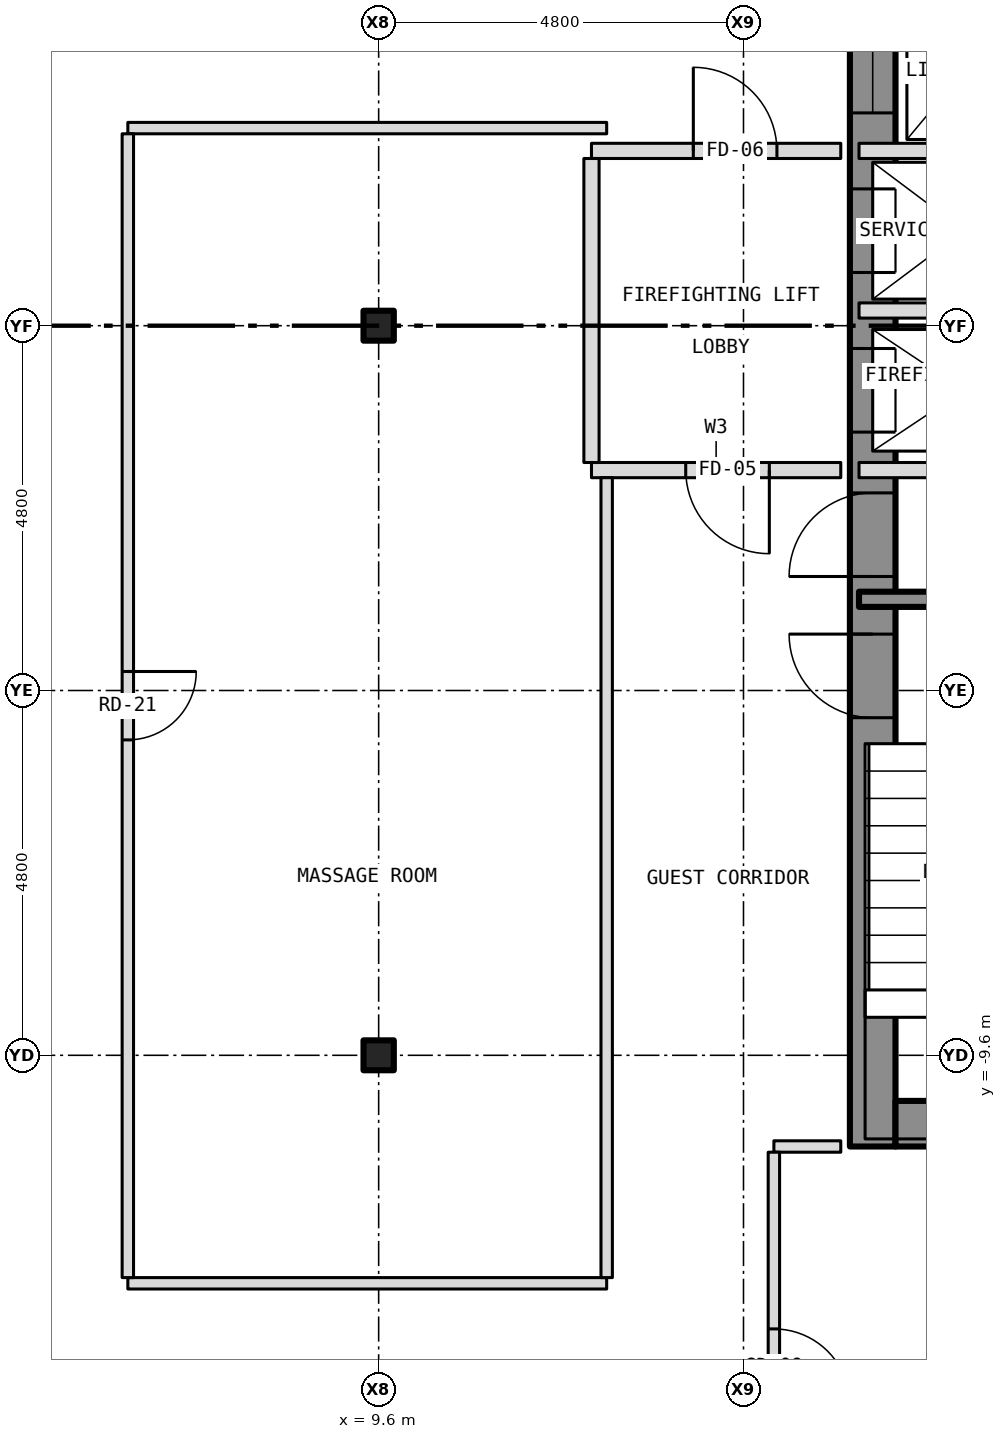
"""IFC4 building model, lengths in metres.
Left out: names, types, materials, properties, quantities, classifications, styles, units other than length and angle.
Written with IfcOpenShell. Run it as: python <this file> out.ifc"""

import sys

from ifc_helpers import new_model, si_unit, direction, frame, frame_2d, origin, origin_2d, place, context, subcontext, project, spatial, rectangle, i_section, extrude, element, fill, save


model = new_model("IFC4")
c1 = context("Model", 3, precision=1e-05, world=origin(), true_north=direction((0.0, 1.0)))
c2 = subcontext(c1, "Body", "Model", "MODEL_VIEW")
j1 = project(units=[si_unit("LENGTHUNIT", "METRE"), si_unit("PLANEANGLEUNIT", "RADIAN")], contexts=[c1])
p1 = place(None, origin())
s1 = spatial("IfcSite", under=j1, at=p1, CompositionType="ELEMENT")
p2 = place(p1, origin())
s2 = spatial("IfcBuilding", under=s1, at=p2, CompositionType="ELEMENT")
p3 = place(p2, frame((0.0, 0.0, 110.0)))
s3 = spatial("IfcBuildingStorey", under=s2, at=p3, CompositionType="ELEMENT", Elevation=110.0)
for number, where, z_axis, x_axis in (
    (1, (9.6, -9.6, -0.15), (0.0, 0.0, 1.0), (1.0, 0.0, 0.0)),
    (2, (9.6, 0.0, -0.15), (0.0, 0.0, 1.0), (1.0, 0.0, 0.0)),
):
    element("IfcColumn", number, at=place(p3, frame(where, z_axis=z_axis, x_axis=x_axis)), inside=s3, PredefinedType="COLUMN", context=c2, shape_type="SweptSolid", body=[
        extrude(i_section(OverallWidth=0.399, OverallDepth=0.394, WebThickness=0.023, FlangeThickness=0.037, at=origin_2d()), origin(), (0.0, 0.0, 1.0), 3.5),
    ])
p4 = place(p3, frame((16.1, -10.8, 0.0), z_axis=(0.0, 0.0, 1.0), x_axis=(0.0, 1.0, 0.0)))
e3 = element("IfcWall", 3, at=p4, inside=s3, PredefinedType="SHEAR", context=c2, shape_type="SweptSolid", body=[
    extrude(rectangle(XDim=21.6, YDim=0.6, at=frame_2d((10.8, 0.0))), origin(), (0.0, 0.0, 1.0), 3.25),
])
p5 = place(p4, frame((9.4, 0.0, 0.0)))
e4 = element("IfcOpeningElement", 4, at=p5, cuts=e3, PredefinedType="OPENING", context=c2, shape_type="SweptSolid", body=[
    extrude(rectangle(XDim=1.1, YDim=2.1, at=frame_2d((0.55, 1.05))), frame((0.0, 0.312, 0.0), z_axis=(0.0, -1.0, 0.0), x_axis=(1.0, 0.0, 0.0)), (0.0, 0.0, 1.0), 0.624),
])
p6 = place(p4, frame((11.5, 0.0, 0.0)))
e5 = element("IfcOpeningElement", 5, at=p6, cuts=e3, PredefinedType="OPENING", context=c2, shape_type="SweptSolid", body=[
    extrude(rectangle(XDim=1.1, YDim=2.1, at=frame_2d((0.55, 1.05))), frame((0.0, 0.312, 0.0), z_axis=(0.0, -1.0, 0.0), x_axis=(1.0, 0.0, 0.0)), (0.0, 0.0, 1.0), 0.624),
])
p7 = place(p4, frame((13.6, 0.0, 0.0)))
e6 = element("IfcOpeningElement", 6, at=p7, cuts=e3, PredefinedType="OPENING", context=c2, shape_type="SweptSolid", body=[
    extrude(rectangle(XDim=1.1, YDim=2.1, at=frame_2d((0.55, 1.05))), frame((0.0, 0.312, 0.0), z_axis=(0.0, -1.0, 0.0), x_axis=(1.0, 0.0, 0.0)), (0.0, 0.0, 1.0), 0.624),
])
p8 = place(p4, frame((15.7, 0.0, 0.0)))
e7 = element("IfcOpeningElement", 7, at=p8, cuts=e3, PredefinedType="OPENING", context=c2, shape_type="SweptSolid", body=[
    extrude(rectangle(XDim=1.1, YDim=2.1, at=frame_2d((0.55, 1.05))), frame((0.0, 0.312, 0.0), z_axis=(0.0, -1.0, 0.0), x_axis=(1.0, 0.0, 0.0)), (0.0, 0.0, 1.0), 0.624),
])
p9 = place(p4, frame((17.8, 0.0, 0.0)))
e8 = element("IfcOpeningElement", 8, at=p9, cuts=e3, PredefinedType="OPENING", context=c2, shape_type="SweptSolid", body=[
    extrude(rectangle(XDim=1.1, YDim=2.1, at=frame_2d((0.55, 1.05))), frame((0.0, 0.312, 0.0), z_axis=(0.0, -1.0, 0.0), x_axis=(1.0, 0.0, 0.0)), (0.0, 0.0, 1.0), 0.624),
])
p10 = place(p4, frame((5.642, 0.0, 0.0)))
e9 = element("IfcOpeningElement", 9, at=p10, cuts=e3, PredefinedType="OPENING", context=c2, shape_type="SweptSolid", body=[
    extrude(rectangle(XDim=1.1, YDim=2.1, at=frame_2d((0.55, 1.05))), frame((0.0, 0.312, 0.0), z_axis=(0.0, -1.0, 0.0), x_axis=(1.0, 0.0, 0.0)), (0.0, 0.0, 1.0), 0.624),
])
p11 = place(p4, frame((7.5, 0.0, 0.0)))
e10 = element("IfcOpeningElement", 10, at=p11, cuts=e3, PredefinedType="OPENING", context=c2, shape_type="SweptSolid", body=[
    extrude(rectangle(XDim=1.1, YDim=2.1, at=frame_2d((0.55, 1.05))), frame((0.0, 0.312, 0.0), z_axis=(0.0, -1.0, 0.0), x_axis=(1.0, 0.0, 0.0)), (0.0, 0.0, 1.0), 0.624),
])
p12 = place(p3, frame((16.4, -10.5, 0.0), z_axis=(0.0, 0.0, 1.0), x_axis=(1.0, 0.0, 0.0)))
e11 = element("IfcWall", 11, at=p12, inside=s3, PredefinedType="SHEAR", context=c2, shape_type="SweptSolid", body=[
    extrude(rectangle(XDim=5.8, YDim=0.6, at=frame_2d((2.9, 0.0))), origin(), (0.0, 0.0, 1.0), 3.25),
])
p13 = place(p3, frame((6.3, -12.6, 0.0), z_axis=(0.0, 0.0, 1.0), x_axis=(1.0, 0.0, 0.0)))
e12 = element("IfcWall", 12, at=p13, inside=s3, PredefinedType="PARTITIONING", context=c2, shape_type="SweptSolid", body=[
    extrude(rectangle(XDim=6.3, YDim=0.15, at=frame_2d((3.15, 0.0))), origin(), (0.0, 0.0, 1.0), 3.35),
])
p14 = place(p3, frame((14.8, -10.8, 0.0), z_axis=(0.0, 0.0, 1.0), x_axis=(1.0, 0.0, 0.0)))
e13 = element("IfcWall", 13, at=p14, inside=s3, PredefinedType="PARTITIONING", context=c2, shape_type="SweptSolid", body=[
    extrude(rectangle(XDim=0.88, YDim=0.15, at=frame_2d((0.44, 0.0))), origin(), (0.0, 0.0, 1.0), 3.35),
])
p15 = place(p3, frame((15.92, -3.6, 0.0), z_axis=(0.0, 0.0, 1.0), x_axis=(1.0, 0.0, 0.0)))
e14 = element("IfcWall", 14, at=p15, inside=s3, PredefinedType="SHEAR", context=c2, shape_type="SweptSolid", body=[
    extrude(rectangle(XDim=4.08, YDim=0.2, at=frame_2d((2.04, 0.0))), origin(), (0.0, 0.0, 1.0), 3.25),
])
p16 = place(p3, frame((12.4, -1.9, 0.0), z_axis=(0.0, 0.0, 1.0), x_axis=(1.0, 0.0, 0.0)))
e15 = element("IfcWall", 15, at=p16, inside=s3, PredefinedType="PARTITIONING", context=c2, shape_type="SweptSolid", body=[
    extrude(rectangle(XDim=3.28, YDim=0.2, at=frame_2d((1.64, 0.0))), origin(), (0.0, 0.0, 1.0), 3.35),
])
p17 = place(p16, frame((1.24, 0.0, 0.0)))
e16 = element("IfcOpeningElement", 16, at=p17, cuts=e15, PredefinedType="OPENING", context=c2, shape_type="SweptSolid", body=[
    extrude(rectangle(XDim=1.1, YDim=2.1, at=frame_2d((0.55, 1.05))), frame((0.0, 0.112, 0.0), z_axis=(0.0, -1.0, 0.0), x_axis=(1.0, 0.0, 0.0)), (0.0, 0.0, 1.0), 0.224),
])
p18 = place(p3, frame((15.92, -1.9, 0.0), z_axis=(0.0, 0.0, 1.0), x_axis=(1.0, 0.0, 0.0)))
e17 = element("IfcWall", 17, at=p18, inside=s3, PredefinedType="PARTITIONING", context=c2, shape_type="SweptSolid", body=[
    extrude(rectangle(XDim=6.76, YDim=0.2, at=frame_2d((3.38, 0.0))), origin(), (0.0, 0.0, 1.0), 3.25),
])
p19 = place(p18, frame((3.74, 0.0, 0.0)))
e18 = element("IfcOpeningElement", 18, at=p19, cuts=e17, PredefinedType="OPENING", context=c2, shape_type="SweptSolid", body=[
    extrude(rectangle(XDim=0.9, YDim=2.1, at=frame_2d((0.45, 1.05))), frame((0.0, 0.112, 0.0), z_axis=(0.0, -1.0, 0.0), x_axis=(1.0, 0.0, 0.0)), (0.0, 0.0, 1.0), 0.224),
])
p20 = place(p3, frame((15.92, 0.2, 0.0), z_axis=(0.0, 0.0, 1.0), x_axis=(1.0, 0.0, 0.0)))
e19 = element("IfcWall", 19, at=p20, inside=s3, PredefinedType="PARTITIONING", context=c2, shape_type="SweptSolid", body=[
    extrude(rectangle(XDim=2.88, YDim=0.2, at=frame_2d((1.44, 0.0))), origin(), (0.0, 0.0, 1.0), 3.25),
])
p21 = place(p3, frame((12.4, 2.3, 0.0), z_axis=(0.0, 0.0, 1.0), x_axis=(1.0, 0.0, 0.0)))
e20 = element("IfcWall", 20, at=p21, inside=s3, PredefinedType="PARTITIONING", context=c2, shape_type="SweptSolid", body=[
    extrude(rectangle(XDim=3.28, YDim=0.2, at=frame_2d((1.64, 0.0))), origin(), (0.0, 0.0, 1.0), 3.35),
])
p22 = place(p21, frame((1.34, 0.0, 0.0)))
e21 = element("IfcOpeningElement", 21, at=p22, cuts=e20, PredefinedType="OPENING", context=c2, shape_type="SweptSolid", body=[
    extrude(rectangle(XDim=1.1, YDim=2.1, at=frame_2d((0.55, 1.05))), frame((0.0, 0.112, 0.0), z_axis=(0.0, -1.0, 0.0), x_axis=(1.0, 0.0, 0.0)), (0.0, 0.0, 1.0), 0.224),
])
p23 = place(p3, frame((15.92, 2.3, 0.0), z_axis=(0.0, 0.0, 1.0), x_axis=(1.0, 0.0, 0.0)))
e22 = element("IfcWall", 22, at=p23, inside=s3, PredefinedType="PARTITIONING", context=c2, shape_type="SweptSolid", body=[
    extrude(rectangle(XDim=2.88, YDim=0.2, at=frame_2d((1.44, 0.0))), origin(), (0.0, 0.0, 1.0), 3.25),
])
p24 = place(p3, frame((6.3, 2.6, 0.0), z_axis=(0.0, 0.0, 1.0), x_axis=(1.0, 0.0, 0.0)))
e23 = element("IfcWall", 23, at=p24, inside=s3, PredefinedType="PARTITIONING", context=c2, shape_type="SweptSolid", body=[
    extrude(rectangle(XDim=6.3, YDim=0.15, at=frame_2d((3.15, 0.0))), origin(), (0.0, 0.0, 1.0), 3.35),
])
p25 = place(p3, frame((6.3, -12.525, 0.0), z_axis=(0.0, 0.0, 1.0), x_axis=(0.0, 1.0, 0.0)))
e24 = element("IfcWall", 24, at=p25, inside=s3, PredefinedType="PARTITIONING", context=c2, shape_type="SweptSolid", body=[
    extrude(rectangle(XDim=15.05, YDim=0.15, at=frame_2d((7.525, 0.0))), origin(), (0.0, 0.0, 1.0), 3.35),
])
p26 = place(p25, frame((7.075, 0.0, 0.0)))
e25 = element("IfcOpeningElement", 25, at=p26, cuts=e24, PredefinedType="OPENING", context=c2, shape_type="SweptSolid", body=[
    extrude(rectangle(XDim=0.9, YDim=2.1, at=frame_2d((0.45, 1.05))), frame((0.0, 0.087, 0.0), z_axis=(0.0, -1.0, 0.0), x_axis=(1.0, 0.0, 0.0)), (0.0, 0.0, 1.0), 0.174),
])
p27 = place(p3, frame((12.4, -1.8, 0.0), z_axis=(0.0, 0.0, 1.0), x_axis=(0.0, 1.0, 0.0)))
e26 = element("IfcWall", 26, at=p27, inside=s3, PredefinedType="PARTITIONING", context=c2, shape_type="SweptSolid", body=[
    extrude(rectangle(XDim=4.0, YDim=0.2, at=frame_2d((2.0, 0.0))), origin(), (0.0, 0.0, 1.0), 3.35),
])
p28 = place(p3, frame((12.6, -12.525, 0.0), z_axis=(0.0, 0.0, 1.0), x_axis=(0.0, 1.0, 0.0)))
e27 = element("IfcWall", 27, at=p28, inside=s3, PredefinedType="PARTITIONING", context=c2, shape_type="SweptSolid", body=[
    extrude(rectangle(XDim=10.525, YDim=0.15, at=frame_2d((5.262, 0.0))), origin(), (0.0, 0.0, 1.0), 3.35),
])
p29 = place(p3, frame((14.8, -14.725, 0.0), z_axis=(0.0, 0.0, 1.0), x_axis=(0.0, 1.0, 0.0)))
e28 = element("IfcWall", 28, at=p29, inside=s3, PredefinedType="PARTITIONING", context=c2, shape_type="SweptSolid", body=[
    extrude(rectangle(XDim=3.85, YDim=0.15, at=frame_2d((1.925, 0.0))), origin(), (0.0, 0.0, 1.0), 3.35),
])
p30 = place(p29, frame((0.525, 0.0, 0.0)))
e29 = element("IfcOpeningElement", 29, at=p30, cuts=e28, PredefinedType="OPENING", context=c2, shape_type="SweptSolid", body=[
    extrude(rectangle(XDim=1.0, YDim=2.1, at=frame_2d((0.5, 1.05))), frame((0.0, 0.087, 0.0), z_axis=(0.0, -1.0, 0.0), x_axis=(1.0, 0.0, 0.0)), (0.0, 0.0, 1.0), 0.174),
])
p31 = place(p5, origin())
e30 = element("IfcDoor", 30, at=p31, inside=s3, OperationType="SLIDING_TO_LEFT", PredefinedType="DOOR", context=c2, shape_type="SweptSolid", body=[
    extrude(rectangle(XDim=1.1, YDim=2.1, at=frame_2d((0.55, 1.05))), frame((0.0, 0.025, 0.0), z_axis=(0.0, -1.0, 0.0), x_axis=(1.0, 0.0, 0.0)), (0.0, 0.0, 1.0), 0.05),
])
fill(e4, e30)
p32 = place(p6, origin())
e31 = element("IfcDoor", 31, at=p32, inside=s3, OperationType="SLIDING_TO_LEFT", PredefinedType="DOOR", context=c2, shape_type="SweptSolid", body=[
    extrude(rectangle(XDim=1.1, YDim=2.1, at=frame_2d((0.55, 1.05))), frame((0.0, 0.025, 0.0), z_axis=(0.0, -1.0, 0.0), x_axis=(1.0, 0.0, 0.0)), (0.0, 0.0, 1.0), 0.05),
])
fill(e5, e31)
p33 = place(p7, origin())
e32 = element("IfcDoor", 32, at=p33, inside=s3, OperationType="SLIDING_TO_LEFT", PredefinedType="DOOR", context=c2, shape_type="SweptSolid", body=[
    extrude(rectangle(XDim=1.1, YDim=2.1, at=frame_2d((0.55, 1.05))), frame((0.0, 0.025, 0.0), z_axis=(0.0, -1.0, 0.0), x_axis=(1.0, 0.0, 0.0)), (0.0, 0.0, 1.0), 0.05),
])
fill(e6, e32)
p34 = place(p10, origin())
e33 = element("IfcDoor", 33, at=p34, inside=s3, OperationType="SINGLE_SWING_RIGHT", PredefinedType="DOOR", context=c2, shape_type="SweptSolid", body=[
    extrude(rectangle(XDim=1.1, YDim=2.1, at=frame_2d((0.55, 1.05))), frame((0.0, 0.025, 0.0), z_axis=(0.0, -1.0, 0.0), x_axis=(1.0, 0.0, 0.0)), (0.0, 0.0, 1.0), 0.05),
])
fill(e9, e33)
p35 = place(p11, origin())
e34 = element("IfcDoor", 34, at=p35, inside=s3, OperationType="SINGLE_SWING_LEFT", PredefinedType="DOOR", context=c2, shape_type="SweptSolid", body=[
    extrude(rectangle(XDim=1.1, YDim=2.1, at=frame_2d((0.55, 1.05))), frame((0.0, 0.025, 0.0), z_axis=(0.0, -1.0, 0.0), x_axis=(1.0, 0.0, 0.0)), (0.0, 0.0, 1.0), 0.05),
])
fill(e10, e34)
p36 = place(p17, origin())
e35 = element("IfcDoor", 35, at=p36, inside=s3, OperationType="SINGLE_SWING_RIGHT", PredefinedType="DOOR", context=c2, shape_type="SweptSolid", body=[
    extrude(rectangle(XDim=1.1, YDim=2.1, at=frame_2d((0.55, 1.05))), frame((0.0, 0.025, 0.0), z_axis=(0.0, -1.0, 0.0), x_axis=(1.0, 0.0, 0.0)), (0.0, 0.0, 1.0), 0.05),
])
fill(e16, e35)
p37 = place(p22, origin())
e36 = element("IfcDoor", 36, at=p37, inside=s3, OperationType="SINGLE_SWING_LEFT", PredefinedType="DOOR", context=c2, shape_type="SweptSolid", body=[
    extrude(rectangle(XDim=1.1, YDim=2.1, at=frame_2d((0.55, 1.05))), frame((0.0, 0.025, 0.0), z_axis=(0.0, -1.0, 0.0), x_axis=(1.0, 0.0, 0.0)), (0.0, 0.0, 1.0), 0.05),
])
fill(e21, e36)
p38 = place(p30, origin())
e37 = element("IfcDoor", 37, at=p38, inside=s3, OperationType="SINGLE_SWING_LEFT", PredefinedType="DOOR", context=c2, shape_type="SweptSolid", body=[
    extrude(rectangle(XDim=1.0, YDim=2.1, at=frame_2d((0.5, 1.05))), frame((0.0, 0.025, 0.0), z_axis=(0.0, -1.0, 0.0), x_axis=(1.0, 0.0, 0.0)), (0.0, 0.0, 1.0), 0.05),
])
fill(e29, e37)
p39 = place(p26, origin())
e38 = element("IfcDoor", 38, at=p39, inside=s3, OperationType="SINGLE_SWING_RIGHT", PredefinedType="DOOR", context=c2, shape_type="SweptSolid", body=[
    extrude(rectangle(XDim=0.9, YDim=2.1, at=frame_2d((0.45, 1.05))), frame((0.0, 0.025, 0.0), z_axis=(0.0, -1.0, 0.0), x_axis=(1.0, 0.0, 0.0)), (0.0, 0.0, 1.0), 0.05),
])
fill(e25, e38)
save(model, sys.argv[1])
